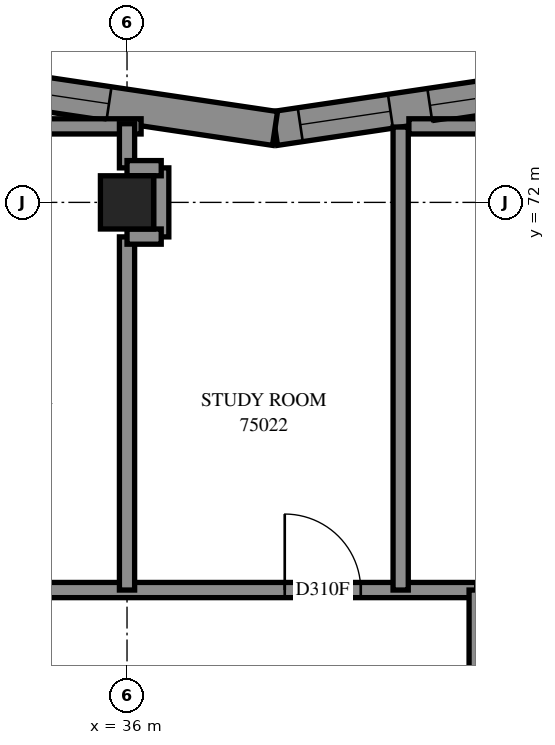
"""IFC4 building model, lengths in metres.
Left out: names, types, materials, properties, quantities, classifications, styles, units other than length and angle.
Written with IfcOpenShell. Run it as: python <this file> out.ifc"""

import sys

from ifc_helpers import new_model, si_unit, direction, frame, frame_2d, origin, origin_2d, place, context, subcontext, project, spatial, polyline, rectangle, outline, extrude, element, fill, save


model = new_model("IFC4")
c1 = context("Model", 3, precision=1e-05, world=origin(), true_north=direction((0.0, 1.0)))
c2 = subcontext(c1, "Body", "Model", "MODEL_VIEW")
j1 = project(units=[si_unit("LENGTHUNIT", "METRE"), si_unit("PLANEANGLEUNIT", "RADIAN")], contexts=[c1])
p1 = place(None, origin())
s1 = spatial("IfcSite", under=j1, at=p1, CompositionType="ELEMENT")
p2 = place(p1, origin())
s2 = spatial("IfcBuilding", under=s1, at=p2, CompositionType="ELEMENT")
p3 = place(p2, frame((0.0, 0.0, 274.4)))
s3 = spatial("IfcBuildingStorey", under=s2, at=p3, CompositionType="ELEMENT", Elevation=274.4)
p4 = place(p3, frame((36.0, 72.0, 0.0), z_axis=(0.0, 0.0, 1.0), x_axis=(1.0, 0.0, 0.0)))
e1 = element("IfcColumn", 1, at=p4, inside=s3, PredefinedType="COLUMN", context=c2, shape_type="SweptSolid", body=[
    extrude(rectangle(XDim=0.7, YDim=0.7, at=origin_2d()), origin(), (0.0, 0.0, 1.0), 3.1),
])
p5 = place(p3, frame((41.786, 73.544, 0.0), z_axis=(0.0, 0.0, 1.0), x_axis=(-0.9890847468, -0.1473477641, 0.0)))
e2 = element("IfcWall", 2, at=p5, inside=s3, PredefinedType="SOLIDWALL", context=c2, shape_type="SweptSolid", body=[
    extrude(outline(polyline([(-0.034, -0.225), (3.849, -0.225), (3.916, 0.225), (0.034, 0.225), (-0.034, -0.225)])), origin(), (0.0, 0.0, 1.0), 3.1),
])
p6 = place(p5, frame((0.622, 0.0, 0.45)))
e3 = element("IfcOpeningElement", 3, at=p6, cuts=e2, PredefinedType="OPENING", context=c2, shape_type="SweptSolid", body=[
    extrude(rectangle(XDim=1.2, YDim=2.55, at=frame_2d((0.6, 1.275))), frame((0.0, 0.235, 0.0), z_axis=(0.0, -1.0, 0.0), x_axis=(1.0, 0.0, 0.0)), (0.0, 0.0, 1.0), 0.47),
])
p7 = place(p5, frame((2.346, 0.0, 0.45)))
e4 = element("IfcOpeningElement", 4, at=p7, cuts=e2, PredefinedType="OPENING", context=c2, shape_type="SweptSolid", body=[
    extrude(rectangle(XDim=1.2, YDim=2.55, at=frame_2d((0.6, 1.275))), frame((0.0, 0.235, 0.0), z_axis=(0.0, -1.0, 0.0), x_axis=(1.0, 0.0, 0.0)), (0.0, 0.0, 1.0), 0.47),
])
p8 = place(p3, frame((37.947, 72.972, 0.0), z_axis=(0.0, 0.0, 1.0), x_axis=(-0.9890847468, 0.1473477641, 0.0)))
e5 = element("IfcWall", 5, at=p8, inside=s3, PredefinedType="SOLIDWALL", context=c2, shape_type="SweptSolid", body=[
    extrude(outline(polyline([(0.034, -0.225), (3.916, -0.225), (3.849, 0.225), (-0.034, 0.225), (0.034, -0.225)])), origin(), (0.0, 0.0, 1.0), 3.1),
])
p9 = place(p8, frame((2.208, 0.0, 0.45)))
e6 = element("IfcOpeningElement", 6, at=p9, cuts=e5, PredefinedType="OPENING", context=c2, shape_type="SweptSolid", body=[
    extrude(rectangle(XDim=1.2, YDim=2.55, at=frame_2d((0.6, 1.275))), frame((0.0, 0.235, 0.0), z_axis=(0.0, -1.0, 0.0), x_axis=(1.0, 0.0, 0.0)), (0.0, 0.0, 1.0), 0.47),
])
p10 = place(p3, frame((28.8, 66.9, 0.0), z_axis=(0.0, 0.0, 1.0), x_axis=(1.0, 0.0, 0.0)))
e7 = element("IfcWall", 7, at=p10, inside=s3, PredefinedType="PARTITIONING", context=c2, shape_type="SweptSolid", body=[
    extrude(rectangle(XDim=11.8, YDim=0.2, at=frame_2d((5.9, 0.0))), origin(), (0.0, 0.0, 1.0), 3.1),
])
p11 = place(p10, frame((2.075, 0.0, 0.0)))
e8 = element("IfcOpeningElement", 8, at=p11, cuts=e7, PredefinedType="OPENING", context=c2, shape_type="SweptSolid", body=[
    extrude(rectangle(XDim=1.0, YDim=2.1, at=frame_2d((0.5, 1.05))), frame((0.0, 0.11, 0.0), z_axis=(0.0, -1.0, 0.0), x_axis=(1.0, 0.0, 0.0)), (0.0, 0.0, 1.0), 0.22),
])
p12 = place(p10, frame((9.275, 0.0, 0.0)))
e9 = element("IfcOpeningElement", 9, at=p12, cuts=e7, PredefinedType="OPENING", context=c2, shape_type="SweptSolid", body=[
    extrude(rectangle(XDim=1.0, YDim=2.1, at=frame_2d((0.5, 1.05))), frame((0.0, 0.11, 0.0), z_axis=(0.0, -1.0, 0.0), x_axis=(1.0, 0.0, 0.0)), (0.0, 0.0, 1.0), 0.22),
])
p13 = place(p10, frame((4.28, 0.0, 0.0)))
e10 = element("IfcOpeningElement", 10, at=p13, cuts=e7, PredefinedType="OPENING", context=c2, shape_type="SweptSolid", body=[
    extrude(rectangle(XDim=1.0, YDim=2.1, at=frame_2d((0.5, 1.05))), frame((0.0, 0.11, 0.0), z_axis=(0.0, -1.0, 0.0), x_axis=(1.0, 0.0, 0.0)), (0.0, 0.0, 1.0), 0.22),
])
p14 = place(p3, frame((39.6, 66.9, 0.0), z_axis=(0.0, 0.0, 1.0), x_axis=(0.0, 1.0, 0.0)))
e11 = element("IfcWall", 11, at=p14, inside=s3, PredefinedType="PARTITIONING", context=c2, shape_type="SweptSolid", body=[
    extrude(rectangle(XDim=6.091, YDim=0.2, at=frame_2d((3.046, 0.0))), origin(), (0.0, 0.0, 1.0), 3.1),
])
p15 = place(p3, frame((40.6, 62.202, 0.0), z_axis=(0.0, 0.0, 1.0), x_axis=(0.0, 1.0, 0.0)))
e12 = element("IfcWall", 12, at=p15, inside=s3, PredefinedType="PARTITIONING", context=c2, shape_type="SweptSolid", body=[
    extrude(rectangle(XDim=4.698, YDim=0.2, at=frame_2d((2.349, 0.0))), origin(), (0.0, 0.0, 1.0), 3.1),
])
p16 = place(p15, frame((0.146, 0.0, 0.0)))
e13 = element("IfcOpeningElement", 13, at=p16, cuts=e12, PredefinedType="OPENING", context=c2, shape_type="SweptSolid", body=[
    extrude(rectangle(XDim=1.0, YDim=2.1, at=frame_2d((0.5, 1.05))), frame((0.0, 0.11, 0.0), z_axis=(0.0, -1.0, 0.0), x_axis=(1.0, 0.0, 0.0)), (0.0, 0.0, 1.0), 0.22),
])
p17 = place(p3, frame((36.0, 66.9, 0.0), z_axis=(0.0, 0.0, 1.0), x_axis=(0.0, 1.0, 0.0)))
e14 = element("IfcWall", 14, at=p17, inside=s3, PredefinedType="PARTITIONING", context=c2, shape_type="SweptSolid", body=[
    extrude(rectangle(XDim=4.646, YDim=0.2, at=frame_2d((2.323, 0.0))), origin(), (0.0, 0.0, 1.0), 3.1),
])
p18 = place(p3, frame((32.029, 73.0, 0.0), z_axis=(0.0, 0.0, 1.0), x_axis=(1.0, 0.0, 0.0)))
e15 = element("IfcWall", 15, at=p18, inside=s3, PredefinedType="PARTITIONING", context=c2, shape_type="SweptSolid", body=[
    extrude(rectangle(XDim=4.156, YDim=0.2, at=frame_2d((2.078, 0.0))), origin(), (0.0, 0.0, 1.0), 3.1),
])
p19 = place(p3, frame((39.708, 73.0, 0.0), z_axis=(0.0, 0.0, 1.0), x_axis=(1.0, 0.0, 0.0)))
e16 = element("IfcWall", 16, at=p19, inside=s3, PredefinedType="PARTITIONING", context=c2, shape_type="SweptSolid", body=[
    extrude(rectangle(XDim=4.156, YDim=0.2, at=frame_2d((2.078, 0.0))), origin(), (0.0, 0.0, 1.0), 3.1),
])
p20 = place(p3, frame((36.45, 71.546, 0.0), z_axis=(0.0, 0.0, 1.0), x_axis=(0.0, 1.0, 0.0)))
e17 = element("IfcWall", 17, at=p20, inside=s3, PredefinedType="PARTITIONING", context=c2, shape_type="SweptSolid", body=[
    extrude(rectangle(XDim=0.908, YDim=0.2, at=frame_2d((0.454, 0.0))), origin(), (0.0, 0.0, 1.0), 3.1),
])
p21 = place(p3, frame((36.0, 72.454, 0.0), z_axis=(0.0, 0.0, 1.0), x_axis=(0.0, 1.0, 0.0)))
e18 = element("IfcWall", 18, at=p21, inside=s3, PredefinedType="PARTITIONING", context=c2, shape_type="SweptSolid", body=[
    extrude(rectangle(XDim=0.581, YDim=0.2, at=frame_2d((0.29, 0.0))), origin(), (0.0, 0.0, 1.0), 3.1),
])
for number, where, z_axis, x_axis in (
    (19, (36.0, 71.55, 0.0), (0.0, 0.0, 1.0), (1.0, 0.0, 0.0)),
    (20, (36.0, 72.45, 0.0), (0.0, 0.0, 1.0), (1.0, 0.0, 0.0)),
):
    element("IfcWall", number, at=place(p3, frame(where, z_axis=z_axis, x_axis=x_axis)), inside=s3, PredefinedType="PARTITIONING", context=c2, shape_type="SweptSolid", body=[
        extrude(rectangle(XDim=0.45, YDim=0.2, at=frame_2d((0.225, 0.0))), origin(), (0.0, 0.0, 1.0), 3.1),
    ])
p22 = place(p6, origin())
e21 = element("IfcWindow", 21, at=p22, inside=s3, PartitioningType="SINGLE_PANEL", PredefinedType="WINDOW", context=c2, shape_type="SweptSolid", body=[
    extrude(rectangle(XDim=1.2, YDim=2.55, at=frame_2d((0.6, 1.275))), frame((0.0, 0.145, 0.0), z_axis=(0.0, -1.0, 0.0), x_axis=(1.0, 0.0, 0.0)), (0.0, 0.0, 1.0), 0.06),
])
fill(e3, e21)
p23 = place(p7, origin())
e22 = element("IfcWindow", 22, at=p23, inside=s3, PartitioningType="SINGLE_PANEL", PredefinedType="WINDOW", context=c2, shape_type="SweptSolid", body=[
    extrude(rectangle(XDim=1.2, YDim=2.55, at=frame_2d((0.6, 1.275))), frame((0.0, 0.175, 0.0), z_axis=(0.0, -1.0, 0.0), x_axis=(1.0, 0.0, 0.0)), (0.0, 0.0, 1.0), 0.06),
])
fill(e4, e22)
p24 = place(p9, origin())
e23 = element("IfcWindow", 23, at=p24, inside=s3, PartitioningType="SINGLE_PANEL", PredefinedType="WINDOW", context=c2, shape_type="SweptSolid", body=[
    extrude(rectangle(XDim=1.2, YDim=2.55, at=frame_2d((0.6, 1.275))), frame((0.0, 0.165, 0.0), z_axis=(0.0, -1.0, 0.0), x_axis=(1.0, 0.0, 0.0)), (0.0, 0.0, 1.0), 0.06),
])
fill(e6, e23)
p25 = place(p12, origin())
e24 = element("IfcDoor", 24, at=p25, inside=s3, OperationType="SINGLE_SWING_RIGHT", PredefinedType="DOOR", context=c2, shape_type="SweptSolid", body=[
    extrude(rectangle(XDim=1.0, YDim=2.1, at=frame_2d((0.5, 1.05))), frame((0.0, 0.025, 0.0), z_axis=(0.0, -1.0, 0.0), x_axis=(1.0, 0.0, 0.0)), (0.0, 0.0, 1.0), 0.05),
])
fill(e9, e24)
save(model, sys.argv[1])
